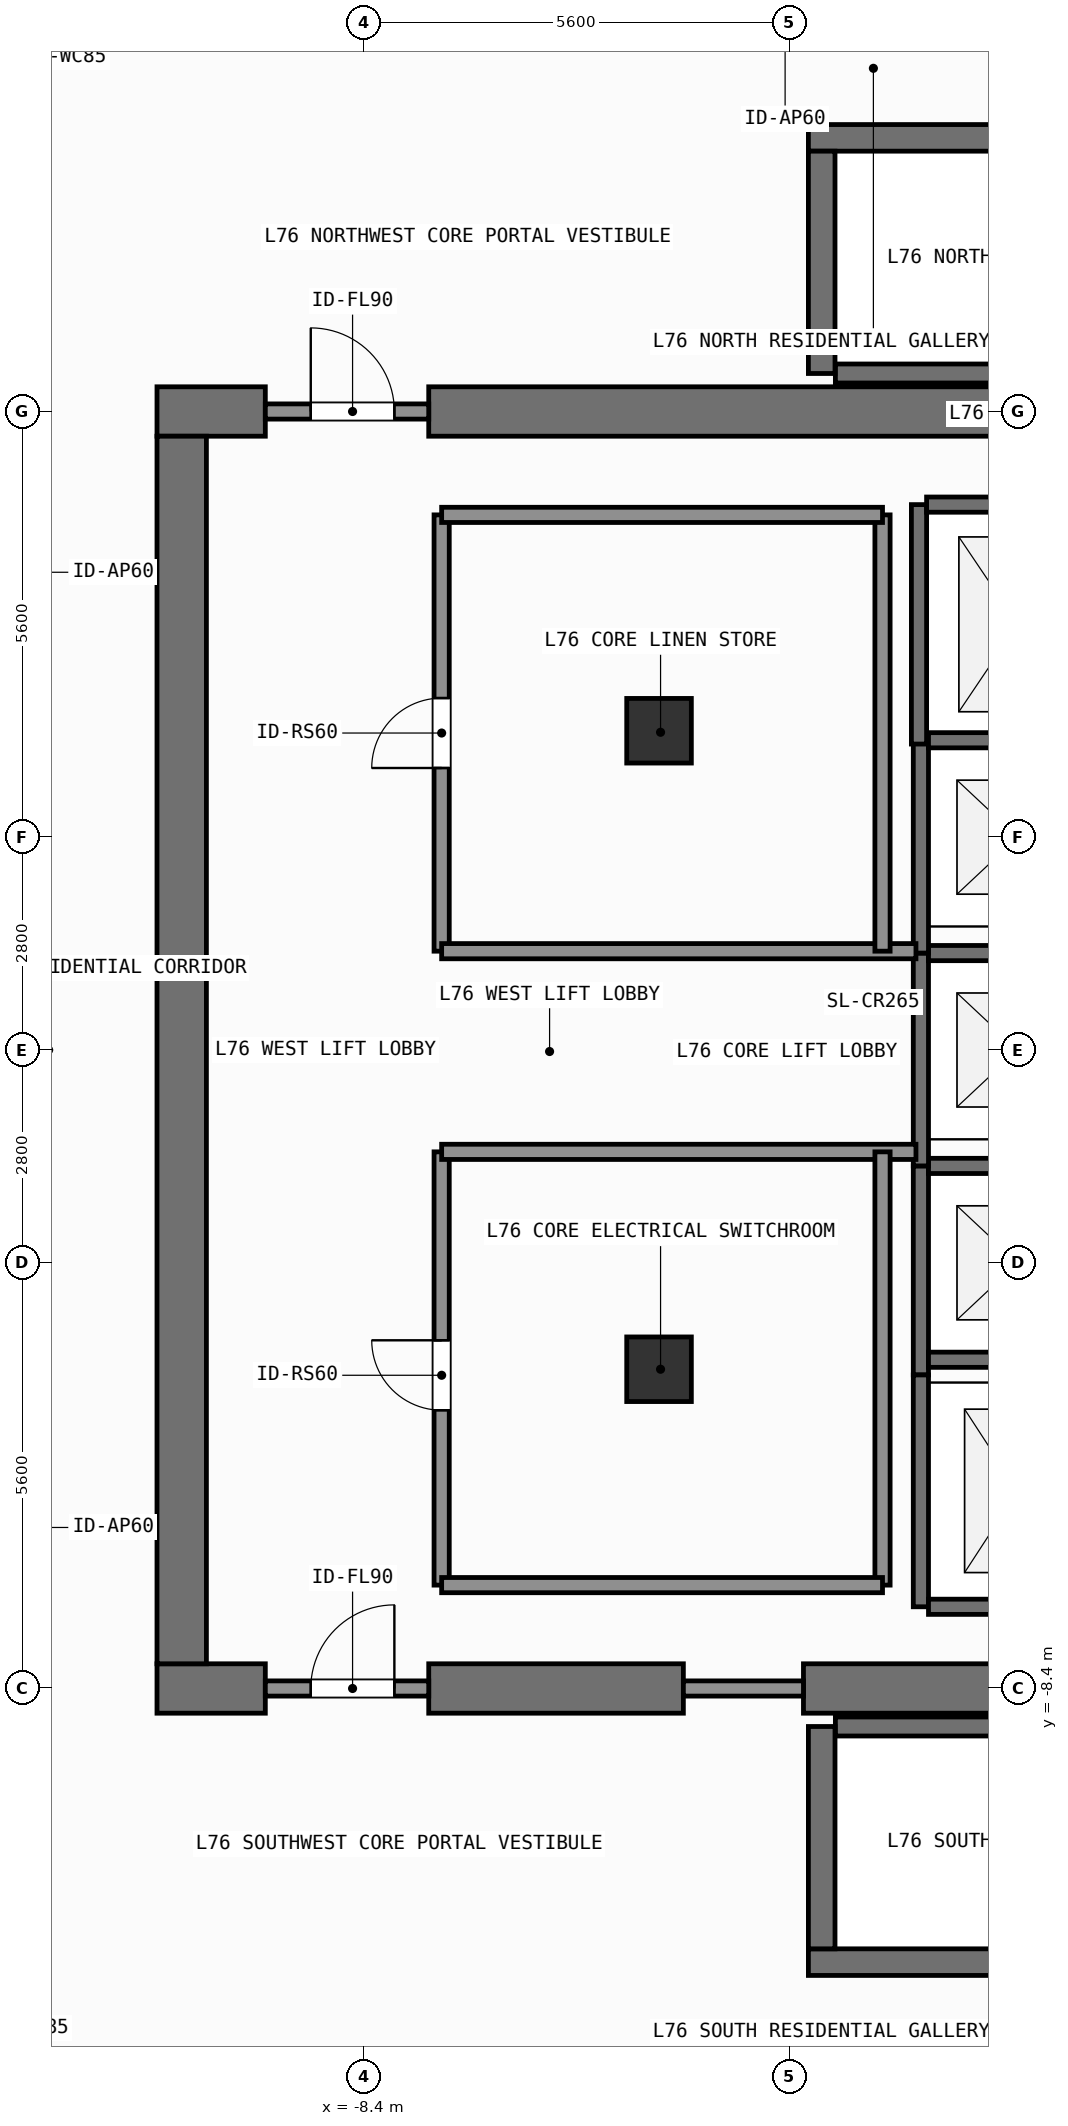
"""IFC4 building model, lengths in metres.
Left out: names, types, materials, properties, quantities, classifications, styles, units other than length and angle.
Written with IfcOpenShell. Run it as: python <this file> out.ifc"""

import sys

from ifc_helpers import new_model, si_unit, direction, frame, frame_2d, origin, origin_2d, place, context, subcontext, project, spatial, rectangle, extrude, element, fill, save


model = new_model("IFC4")
c1 = context("Model", 3, precision=1e-05, world=origin(), true_north=direction((0.0, 1.0)))
c2 = subcontext(c1, "Body", "Model", "MODEL_VIEW")
j1 = project(units=[si_unit("LENGTHUNIT", "METRE"), si_unit("PLANEANGLEUNIT", "RADIAN")], contexts=[c1])
p1 = place(None, origin())
s1 = spatial("IfcSite", under=j1, at=p1, CompositionType="ELEMENT")
p2 = place(p1, origin())
s2 = spatial("IfcBuilding", under=s1, at=p2, CompositionType="ELEMENT")
p3 = place(p2, frame((0.0, 0.0, 309.3)))
s3 = spatial("IfcBuildingStorey", under=s2, at=p3, CompositionType="ELEMENT", Elevation=309.3)
p4 = place(p3, frame((-11.125, -8.4, 0.0), z_axis=(0.0, 0.0, 1.0), x_axis=(1.0, 0.0, 0.0)))
e1 = element("IfcWall", 1, at=p4, inside=s3, PredefinedType="SHEAR", context=c2, shape_type="SweptSolid", body=[
    extrude(rectangle(XDim=1.425, YDim=0.65, at=frame_2d((0.712, 0.0))), origin(), (0.0, 0.0, 1.0), 3.9),
])
p5 = place(p3, frame((-7.55, -8.4, 0.0), z_axis=(0.0, 0.0, 1.0), x_axis=(1.0, 0.0, 0.0)))
e2 = element("IfcWall", 2, at=p5, inside=s3, PredefinedType="SHEAR", context=c2, shape_type="SweptSolid", body=[
    extrude(rectangle(XDim=3.35, YDim=0.65, at=frame_2d((1.675, 0.0))), origin(), (0.0, 0.0, 1.0), 3.9),
])
p6 = place(p3, frame((-2.62, -8.4, 0.0), z_axis=(0.0, 0.0, 1.0), x_axis=(1.0, 0.0, 0.0)))
e3 = element("IfcWall", 3, at=p6, inside=s3, PredefinedType="SHEAR", context=c2, shape_type="SweptSolid", body=[
    extrude(rectangle(XDim=7.27, YDim=0.65, at=frame_2d((3.635, 0.0))), origin(), (0.0, 0.0, 1.0), 3.9),
])
p7 = place(p3, frame((-11.125, 8.4, 0.0), z_axis=(0.0, 0.0, 1.0), x_axis=(1.0, 0.0, 0.0)))
e4 = element("IfcWall", 4, at=p7, inside=s3, PredefinedType="SHEAR", context=c2, shape_type="SweptSolid", body=[
    extrude(rectangle(XDim=1.425, YDim=0.65, at=frame_2d((0.712, 0.0))), origin(), (0.0, 0.0, 1.0), 3.9),
])
p8 = place(p3, frame((-7.55, 8.4, 0.0), z_axis=(0.0, 0.0, 1.0), x_axis=(1.0, 0.0, 0.0)))
e5 = element("IfcWall", 5, at=p8, inside=s3, PredefinedType="SHEAR", context=c2, shape_type="SweptSolid", body=[
    extrude(rectangle(XDim=16.275, YDim=0.65, at=frame_2d((8.138, 0.0))), origin(), (0.0, 0.0, 1.0), 3.9),
])
p9 = place(p3, frame((-10.8, -8.075, 0.0), z_axis=(0.0, 0.0, 1.0), x_axis=(0.0, 1.0, 0.0)))
e6 = element("IfcWall", 6, at=p9, inside=s3, PredefinedType="SHEAR", context=c2, shape_type="SweptSolid", body=[
    extrude(rectangle(XDim=16.15, YDim=0.65, at=frame_2d((8.075, 0.0))), origin(), (0.0, 0.0, 1.0), 3.9),
])
p10 = place(p3, frame((-2.555, -12.0, 0.0), z_axis=(0.0, 0.0, 1.0), x_axis=(1.0, 0.0, 0.0)))
e7 = element("IfcWall", 7, at=p10, inside=s3, PredefinedType="SHEAR", context=c2, shape_type="SweptSolid", body=[
    extrude(rectangle(XDim=7.31, YDim=0.35, at=frame_2d((3.655, 0.0))), origin(), (0.0, 0.0, 1.0), 3.9),
])
p11 = place(p3, frame((-2.2, -8.9, 0.0), z_axis=(0.0, 0.0, 1.0), x_axis=(1.0, 0.0, 0.0)))
e8 = element("IfcWall", 8, at=p11, inside=s3, PredefinedType="SHEAR", context=c2, shape_type="SweptSolid", body=[
    extrude(rectangle(XDim=6.6, YDim=0.25, at=frame_2d((3.3, 0.0))), origin(), (0.0, 0.0, 1.0), 3.9),
])
p12 = place(p3, frame((-2.38, -11.825, 0.0), z_axis=(0.0, 0.0, 1.0), x_axis=(0.0, 1.0, 0.0)))
e9 = element("IfcWall", 9, at=p12, inside=s3, PredefinedType="SHEAR", context=c2, shape_type="SweptSolid", body=[
    extrude(rectangle(XDim=2.925, YDim=0.35, at=frame_2d((1.462, 0.0))), origin(), (0.0, 0.0, 1.0), 3.9),
])
p13 = place(p3, frame((-2.555, 12.0, 0.0), z_axis=(0.0, 0.0, 1.0), x_axis=(1.0, 0.0, 0.0)))
e10 = element("IfcWall", 10, at=p13, inside=s3, PredefinedType="SHEAR", context=c2, shape_type="SweptSolid", body=[
    extrude(rectangle(XDim=7.31, YDim=0.35, at=frame_2d((3.655, 0.0))), origin(), (0.0, 0.0, 1.0), 3.9),
])
p14 = place(p3, frame((-2.2, 8.9, 0.0), z_axis=(0.0, 0.0, 1.0), x_axis=(1.0, 0.0, 0.0)))
e11 = element("IfcWall", 11, at=p14, inside=s3, PredefinedType="SHEAR", context=c2, shape_type="SweptSolid", body=[
    extrude(rectangle(XDim=6.6, YDim=0.25, at=frame_2d((3.3, 0.0))), origin(), (0.0, 0.0, 1.0), 3.9),
])
p15 = place(p3, frame((-2.38, 8.9, 0.0), z_axis=(0.0, 0.0, 1.0), x_axis=(0.0, 1.0, 0.0)))
e12 = element("IfcWall", 12, at=p15, inside=s3, PredefinedType="SHEAR", context=c2, shape_type="SweptSolid", body=[
    extrude(rectangle(XDim=2.925, YDim=0.35, at=frame_2d((1.462, 0.0))), origin(), (0.0, 0.0, 1.0), 3.9),
])
for number, where, z_axis, x_axis in (
    (13, (-4.52, -4.2, 0.0), (0.0, 0.0, 1.0), (1.0, 0.0, 0.0)),
    (14, (-4.52, 4.2, 0.0), (0.0, 0.0, 1.0), (1.0, 0.0, 0.0)),
):
    element("IfcColumn", number, at=place(p3, frame(where, z_axis=z_axis, x_axis=x_axis)), inside=s3, PredefinedType="COLUMN", context=c2, shape_type="SweptSolid", body=[
        extrude(rectangle(XDim=0.85, YDim=0.85, at=origin_2d()), origin(), (0.0, 0.0, 1.0), 3.9),
    ])
p16 = place(p3, frame((-1.075, -4.275, 0.0), z_axis=(0.0, 0.0, 1.0), x_axis=(0.0, 1.0, 0.0)))
e15 = element("IfcWall", 15, at=p16, inside=s3, PredefinedType="SHEAR", context=c2, shape_type="SweptSolid", body=[
    extrude(rectangle(XDim=2.75, YDim=0.2, at=frame_2d((1.375, 0.0))), origin(), (0.0, 0.0, 1.0), 3.64),
])
for number, where, z_axis, x_axis in (
    (16, (-0.975, -4.075, 0.0), (0.0, 0.0, 1.0), (1.0, 0.0, 0.0)),
    (17, (-0.975, -1.525, 0.0), (0.0, 0.0, 1.0), (1.0, 0.0, 0.0)),
):
    element("IfcWall", number, at=place(p3, frame(where, z_axis=z_axis, x_axis=x_axis)), inside=s3, PredefinedType="SHEAR", context=c2, shape_type="SweptSolid", body=[
        extrude(rectangle(XDim=2.35, YDim=0.2, at=frame_2d((1.175, 0.0))), origin(), (0.0, 0.0, 1.0), 3.64),
    ])
p17 = place(p3, frame((-1.075, -1.525, 0.0), z_axis=(0.0, 0.0, 1.0), x_axis=(0.0, 1.0, 0.0)))
e18 = element("IfcWall", 18, at=p17, inside=s3, PredefinedType="SHEAR", context=c2, shape_type="SweptSolid", body=[
    extrude(rectangle(XDim=2.8, YDim=0.2, at=frame_2d((1.4, 0.0))), origin(), (0.0, 0.0, 1.0), 3.64),
])
p18 = place(p3, frame((-0.975, 1.275, 0.0), z_axis=(0.0, 0.0, 1.0), x_axis=(1.0, 0.0, 0.0)))
e19 = element("IfcWall", 19, at=p18, inside=s3, PredefinedType="SHEAR", context=c2, shape_type="SweptSolid", body=[
    extrude(rectangle(XDim=2.35, YDim=0.2, at=frame_2d((1.175, 0.0))), origin(), (0.0, 0.0, 1.0), 3.64),
])
p19 = place(p3, frame((-1.075, 1.275, 0.0), z_axis=(0.0, 0.0, 1.0), x_axis=(0.0, 1.0, 0.0)))
e20 = element("IfcWall", 20, at=p19, inside=s3, PredefinedType="SHEAR", context=c2, shape_type="SweptSolid", body=[
    extrude(rectangle(XDim=2.8, YDim=0.2, at=frame_2d((1.4, 0.0))), origin(), (0.0, 0.0, 1.0), 3.64),
])
p20 = place(p3, frame((-0.975, 4.075, 0.0), z_axis=(0.0, 0.0, 1.0), x_axis=(1.0, 0.0, 0.0)))
e21 = element("IfcWall", 21, at=p20, inside=s3, PredefinedType="SHEAR", context=c2, shape_type="SweptSolid", body=[
    extrude(rectangle(XDim=2.35, YDim=0.2, at=frame_2d((1.175, 0.0))), origin(), (0.0, 0.0, 1.0), 3.64),
])
p21 = place(p3, frame((-1.1, 4.025, 0.0), z_axis=(0.0, 0.0, 1.0), x_axis=(0.0, 1.0, 0.0)))
e22 = element("IfcWall", 22, at=p21, inside=s3, PredefinedType="SHEAR", context=c2, shape_type="SweptSolid", body=[
    extrude(rectangle(XDim=3.15, YDim=0.2, at=frame_2d((1.575, 0.0))), origin(), (0.0, 0.0, 1.0), 3.64),
])
p22 = place(p3, frame((-1.0, 7.175, 0.0), z_axis=(0.0, 0.0, 1.0), x_axis=(1.0, 0.0, 0.0)))
e23 = element("IfcWall", 23, at=p22, inside=s3, PredefinedType="SHEAR", context=c2, shape_type="SweptSolid", body=[
    extrude(rectangle(XDim=2.4, YDim=0.2, at=frame_2d((1.2, 0.0))), origin(), (0.0, 0.0, 1.0), 3.64),
])
p23 = place(p3, frame((-1.075, -7.325, 0.0), z_axis=(0.0, 0.0, 1.0), x_axis=(0.0, 1.0, 0.0)))
e24 = element("IfcWall", 24, at=p23, inside=s3, PredefinedType="SHEAR", context=c2, shape_type="SweptSolid", body=[
    extrude(rectangle(XDim=3.05, YDim=0.2, at=frame_2d((1.525, 0.0))), origin(), (0.0, 0.0, 1.0), 3.64),
])
p24 = place(p3, frame((-0.975, -7.325, 0.0), z_axis=(0.0, 0.0, 1.0), x_axis=(1.0, 0.0, 0.0)))
e25 = element("IfcWall", 25, at=p24, inside=s3, PredefinedType="SHEAR", context=c2, shape_type="SweptSolid", body=[
    extrude(rectangle(XDim=2.35, YDim=0.2, at=frame_2d((1.175, 0.0))), origin(), (0.0, 0.0, 1.0), 3.64),
])
p25 = place(p3, frame((-9.7, -8.4, 0.0), z_axis=(0.0, 0.0, 1.0), x_axis=(1.0, 0.0, 0.0)))
e26 = element("IfcWall", 26, at=p25, inside=s3, PredefinedType="SOLIDWALL", context=c2, shape_type="SweptSolid", body=[
    extrude(rectangle(XDim=2.15, YDim=0.2, at=frame_2d((1.075, 0.0))), origin(), (0.0, 0.0, 1.0), 2.88),
])
p26 = place(p25, frame((0.598, 0.0, 0.0)))
e27 = element("IfcOpeningElement", 27, at=p26, cuts=e26, PredefinedType="OPENING", context=c2, shape_type="SweptSolid", body=[
    extrude(rectangle(XDim=1.1, YDim=2.15, at=frame_2d((0.55, 1.075))), frame((0.0, 0.11, 0.0), z_axis=(0.0, -1.0, 0.0), x_axis=(1.0, 0.0, 0.0)), (0.0, 0.0, 1.0), 0.22),
])
p27 = place(p3, frame((-9.7, 8.4, 0.0), z_axis=(0.0, 0.0, 1.0), x_axis=(1.0, 0.0, 0.0)))
e28 = element("IfcWall", 28, at=p27, inside=s3, PredefinedType="SOLIDWALL", context=c2, shape_type="SweptSolid", body=[
    extrude(rectangle(XDim=2.15, YDim=0.2, at=frame_2d((1.075, 0.0))), origin(), (0.0, 0.0, 1.0), 2.88),
])
p28 = place(p27, frame((0.598, 0.0, 0.0)))
e29 = element("IfcOpeningElement", 29, at=p28, cuts=e28, PredefinedType="OPENING", context=c2, shape_type="SweptSolid", body=[
    extrude(rectangle(XDim=1.1, YDim=2.15, at=frame_2d((0.55, 1.075))), frame((0.0, 0.11, 0.0), z_axis=(0.0, -1.0, 0.0), x_axis=(1.0, 0.0, 0.0)), (0.0, 0.0, 1.0), 0.22),
])
p29 = place(p3, frame((-7.38, -7.04, 0.0), z_axis=(0.0, 0.0, 1.0), x_axis=(0.0, 1.0, 0.0)))
e30 = element("IfcWall", 30, at=p29, inside=s3, PredefinedType="SOLIDWALL", context=c2, shape_type="SweptSolid", body=[
    extrude(rectangle(XDim=5.7, YDim=0.2, at=frame_2d((2.85, 0.0))), origin(), (0.0, 0.0, 1.0), 2.73),
])
p30 = place(p29, frame((2.301, 0.0, 0.0)))
e31 = element("IfcOpeningElement", 31, at=p30, cuts=e30, PredefinedType="OPENING", context=c2, shape_type="SweptSolid", body=[
    extrude(rectangle(XDim=0.92, YDim=2.1, at=frame_2d((0.46, 1.05))), frame((0.0, 0.11, 0.0), z_axis=(0.0, -1.0, 0.0), x_axis=(1.0, 0.0, 0.0)), (0.0, 0.0, 1.0), 0.22),
])
p31 = place(p3, frame((-7.38, 1.3, 0.0), z_axis=(0.0, 0.0, 1.0), x_axis=(0.0, 1.0, 0.0)))
e32 = element("IfcWall", 32, at=p31, inside=s3, PredefinedType="SOLIDWALL", context=c2, shape_type="SweptSolid", body=[
    extrude(rectangle(XDim=5.74, YDim=0.2, at=frame_2d((2.87, 0.0))), origin(), (0.0, 0.0, 1.0), 2.73),
])
p32 = place(p31, frame((2.41, 0.0, 0.0)))
e33 = element("IfcOpeningElement", 33, at=p32, cuts=e32, PredefinedType="OPENING", context=c2, shape_type="SweptSolid", body=[
    extrude(rectangle(XDim=0.92, YDim=2.1, at=frame_2d((0.46, 1.05))), frame((0.0, 0.11, 0.0), z_axis=(0.0, -1.0, 0.0), x_axis=(1.0, 0.0, 0.0)), (0.0, 0.0, 1.0), 0.22),
])
p33 = place(p3, frame((-4.2, -8.4, 0.0), z_axis=(0.0, 0.0, 1.0), x_axis=(1.0, 0.0, 0.0)))
e34 = element("IfcWall", 34, at=p33, inside=s3, PredefinedType="SOLIDWALL", context=c2, shape_type="SweptSolid", body=[
    extrude(rectangle(XDim=1.58, YDim=0.2, at=frame_2d((0.79, 0.0))), origin(), (0.0, 0.0, 1.0), 2.88),
])
for number, where, z_axis, x_axis in (
    (35, (-7.38, -1.34, 0.0), (0.0, 0.0, 1.0), (1.0, 0.0, 0.0)),
    (36, (-7.38, 1.3, 0.0), (0.0, 0.0, 1.0), (1.0, 0.0, 0.0)),
):
    element("IfcWall", number, at=place(p3, frame(where, z_axis=z_axis, x_axis=x_axis)), inside=s3, PredefinedType="SOLIDWALL", context=c2, shape_type="SweptSolid", body=[
        extrude(rectangle(XDim=6.24, YDim=0.2, at=frame_2d((3.12, 0.0))), origin(), (0.0, 0.0, 1.0), 3.64),
    ])
p34 = place(p3, frame((-1.58, -7.04, 0.0), z_axis=(0.0, 0.0, 1.0), x_axis=(0.0, 1.0, 0.0)))
e37 = element("IfcWall", 37, at=p34, inside=s3, PredefinedType="SOLIDWALL", context=c2, shape_type="SweptSolid", body=[
    extrude(rectangle(XDim=5.7, YDim=0.2, at=frame_2d((2.85, 0.0))), origin(), (0.0, 0.0, 1.0), 3.64),
])
p35 = place(p3, frame((-7.38, -7.04, 0.0), z_axis=(0.0, 0.0, 1.0), x_axis=(1.0, 0.0, 0.0)))
e38 = element("IfcWall", 38, at=p35, inside=s3, PredefinedType="SOLIDWALL", context=c2, shape_type="SweptSolid", body=[
    extrude(rectangle(XDim=5.8, YDim=0.2, at=frame_2d((2.9, 0.0))), origin(), (0.0, 0.0, 1.0), 3.64),
])
p36 = place(p3, frame((-1.58, 1.3, 0.0), z_axis=(0.0, 0.0, 1.0), x_axis=(0.0, 1.0, 0.0)))
e39 = element("IfcWall", 39, at=p36, inside=s3, PredefinedType="SOLIDWALL", context=c2, shape_type="SweptSolid", body=[
    extrude(rectangle(XDim=5.74, YDim=0.2, at=frame_2d((2.87, 0.0))), origin(), (0.0, 0.0, 1.0), 3.64),
])
p37 = place(p3, frame((-7.38, 7.04, 0.0), z_axis=(0.0, 0.0, 1.0), x_axis=(1.0, 0.0, 0.0)))
e40 = element("IfcWall", 40, at=p37, inside=s3, PredefinedType="SOLIDWALL", context=c2, shape_type="SweptSolid", body=[
    extrude(rectangle(XDim=5.8, YDim=0.2, at=frame_2d((2.9, 0.0))), origin(), (0.0, 0.0, 1.0), 3.64),
])
p38 = place(p26, origin())
e41 = element("IfcDoor", 41, at=p38, inside=s3, OperationType="SINGLE_SWING_RIGHT", PredefinedType="DOOR", context=c2, shape_type="SweptSolid", body=[
    extrude(rectangle(XDim=1.1, YDim=2.15, at=frame_2d((0.55, 1.075))), frame((0.0, 0.025, 0.0), z_axis=(0.0, -1.0, 0.0), x_axis=(1.0, 0.0, 0.0)), (0.0, 0.0, 1.0), 0.05),
])
fill(e27, e41)
p39 = place(p28, origin())
e42 = element("IfcDoor", 42, at=p39, inside=s3, OperationType="SINGLE_SWING_LEFT", PredefinedType="DOOR", context=c2, shape_type="SweptSolid", body=[
    extrude(rectangle(XDim=1.1, YDim=2.15, at=frame_2d((0.55, 1.075))), frame((0.0, 0.025, 0.0), z_axis=(0.0, -1.0, 0.0), x_axis=(1.0, 0.0, 0.0)), (0.0, 0.0, 1.0), 0.05),
])
fill(e29, e42)
p40 = place(p30, origin())
e43 = element("IfcDoor", 43, at=p40, inside=s3, OperationType="SINGLE_SWING_RIGHT", PredefinedType="DOOR", context=c2, shape_type="SweptSolid", body=[
    extrude(rectangle(XDim=0.92, YDim=2.1, at=frame_2d((0.46, 1.05))), frame((0.0, 0.025, 0.0), z_axis=(0.0, -1.0, 0.0), x_axis=(1.0, 0.0, 0.0)), (0.0, 0.0, 1.0), 0.05),
])
fill(e31, e43)
p41 = place(p32, origin())
e44 = element("IfcDoor", 44, at=p41, inside=s3, OperationType="SINGLE_SWING_LEFT", PredefinedType="DOOR", context=c2, shape_type="SweptSolid", body=[
    extrude(rectangle(XDim=0.92, YDim=2.1, at=frame_2d((0.46, 1.05))), frame((0.0, 0.025, 0.0), z_axis=(0.0, -1.0, 0.0), x_axis=(1.0, 0.0, 0.0)), (0.0, 0.0, 1.0), 0.05),
])
fill(e33, e44)
save(model, sys.argv[1])
